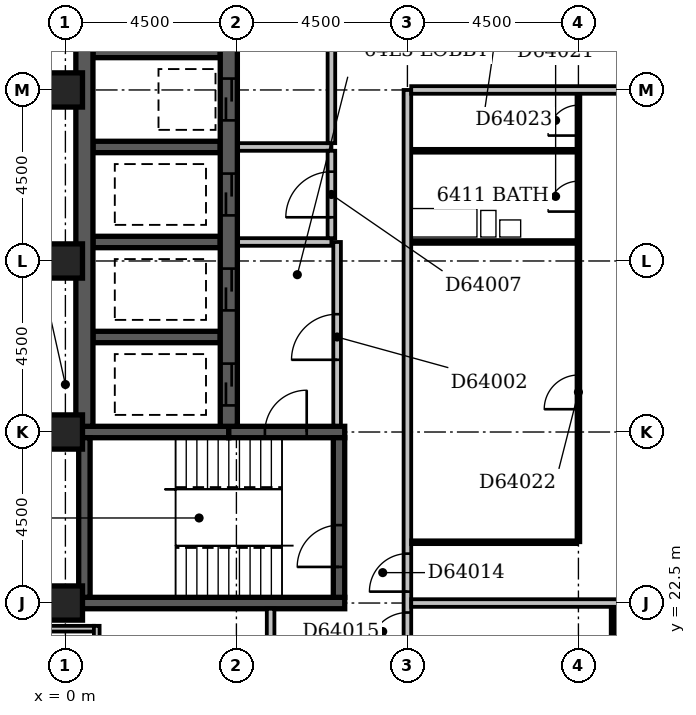
"""IFC4 building model, lengths in metres.
Left out: names, types, materials, properties, quantities, classifications, styles, units other than length and angle.
Written with IfcOpenShell. Run it as: python <this file> out.ifc"""

import sys

from ifc_helpers import new_model, si_unit, direction, frame, frame_2d, origin, origin_2d, place, context, subcontext, project, spatial, rectangle, extrude, element, fill, save


model = new_model("IFC4")
c1 = context("Model", 3, precision=1e-05, world=origin(), true_north=direction((0.0, 1.0)))
c2 = subcontext(c1, "Body", "Model", "MODEL_VIEW")
j1 = project(units=[si_unit("LENGTHUNIT", "METRE"), si_unit("PLANEANGLEUNIT", "RADIAN")], contexts=[c1])
p1 = place(None, origin())
s1 = spatial("IfcSite", under=j1, at=p1, CompositionType="ELEMENT")
p2 = place(p1, origin())
s2 = spatial("IfcBuilding", under=s1, at=p2, CompositionType="ELEMENT")
p3 = place(p2, frame((0.0, 0.0, 247.4)))
s3 = spatial("IfcBuildingStorey", under=s2, at=p3, CompositionType="ELEMENT", Elevation=247.4)
p4 = place(p3, frame((0.35, 22.5, -0.3), z_axis=(0.0, 0.0, 1.0), x_axis=(1.0, 0.0, 0.0)))
e1 = element("IfcWall", 1, at=p4, inside=s3, PredefinedType="SHEAR", context=c2, shape_type="SweptSolid", body=[
    extrude(rectangle(XDim=7.0, YDim=0.3, at=frame_2d((3.5, 0.0))), origin(), (0.0, 0.0, 1.0), 3.6),
])
p5 = place(p3, frame((0.35, 27.0, -0.3), z_axis=(0.0, 0.0, 1.0), x_axis=(1.0, 0.0, 0.0)))
e2 = element("IfcWall", 2, at=p5, inside=s3, PredefinedType="SHEAR", context=c2, shape_type="SweptSolid", body=[
    extrude(rectangle(XDim=3.95, YDim=0.3, at=frame_2d((1.975, 0.0))), origin(), (0.0, 0.0, 1.0), 3.6),
])
p6 = place(p3, frame((0.5, 22.65, -0.3), z_axis=(0.0, 0.0, 1.0), x_axis=(0.0, 1.0, 0.0)))
e3 = element("IfcWall", 3, at=p6, inside=s3, PredefinedType="SHEAR", context=c2, shape_type="SweptSolid", body=[
    extrude(rectangle(XDim=4.2, YDim=0.3, at=frame_2d((2.1, 0.0))), origin(), (0.0, 0.0, 1.0), 3.6),
])
p7 = place(p3, frame((0.5, 27.15, -0.3), z_axis=(0.0, 0.0, 1.0), x_axis=(0.0, 1.0, 0.0)))
e4 = element("IfcWall", 4, at=p7, inside=s3, PredefinedType="SHEAR", context=c2, shape_type="SweptSolid", body=[
    extrude(rectangle(XDim=22.125, YDim=0.45, at=frame_2d((11.062, 0.0))), origin(), (0.0, 0.0, 1.0), 3.6),
])
for number, where, z_axis, x_axis in (
    (5, (0.725, 29.5, -0.3), (0.0, 0.0, 1.0), (1.0, 0.0, 0.0)),
    (6, (0.725, 32.0, -0.3), (0.0, 0.0, 1.0), (1.0, 0.0, 0.0)),
    (7, (0.725, 34.5, -0.3), (0.0, 0.0, 1.0), (1.0, 0.0, 0.0)),
    (8, (0.725, 37.0, -0.3), (0.0, 0.0, 1.0), (1.0, 0.0, 0.0)),
):
    element("IfcWall", number, at=place(p3, frame(where, z_axis=z_axis, x_axis=x_axis)), inside=s3, PredefinedType="SHEAR", context=c2, shape_type="SweptSolid", body=[
        extrude(rectangle(XDim=3.35, YDim=0.3, at=frame_2d((1.675, 0.0))), origin(), (0.0, 0.0, 1.0), 3.6),
    ])
p8 = place(p3, frame((4.3, 27.0, -0.3), z_axis=(0.0, 0.0, 1.0), x_axis=(1.0, 0.0, 0.0)))
e9 = element("IfcWall", 9, at=p8, inside=s3, PredefinedType="SHEAR", context=c2, shape_type="SweptSolid", body=[
    extrude(rectangle(XDim=3.05, YDim=0.3, at=frame_2d((1.525, 0.0))), origin(), (0.0, 0.0, 1.0), 3.6),
])
p9 = place(p8, frame((0.95, 0.0, 0.3)))
e10 = element("IfcOpeningElement", 10, at=p9, cuts=e9, PredefinedType="OPENING", context=c2, shape_type="SweptSolid", body=[
    extrude(rectangle(XDim=1.1, YDim=2.1, at=frame_2d((0.55, 1.05))), frame((0.0, 0.162, 0.0), z_axis=(0.0, -1.0, 0.0), x_axis=(1.0, 0.0, 0.0)), (0.0, 0.0, 1.0), 0.324),
])
p10 = place(p3, frame((4.3, 27.15, -0.3), z_axis=(0.0, 0.0, 1.0), x_axis=(0.0, 1.0, 0.0)))
e11 = element("IfcWall", 11, at=p10, inside=s3, PredefinedType="SHEAR", context=c2, shape_type="SweptSolid", body=[
    extrude(rectangle(XDim=22.125, YDim=0.45, at=frame_2d((11.062, 0.0))), origin(), (0.0, 0.0, 1.0), 3.6),
])
p11 = place(p10, frame((3.05, 0.0, 0.3)))
e12 = element("IfcOpeningElement", 12, at=p11, cuts=e11, PredefinedType="OPENING", context=c2, shape_type="SweptSolid", body=[
    extrude(rectangle(XDim=1.1, YDim=2.1, at=frame_2d((0.55, 1.05))), frame((0.0, 0.237, 0.0), z_axis=(0.0, -1.0, 0.0), x_axis=(1.0, 0.0, 0.0)), (0.0, 0.0, 1.0), 0.474),
])
p12 = place(p10, frame((0.55, 0.0, 0.3)))
e13 = element("IfcOpeningElement", 13, at=p12, cuts=e11, PredefinedType="OPENING", context=c2, shape_type="SweptSolid", body=[
    extrude(rectangle(XDim=1.1, YDim=2.1, at=frame_2d((0.55, 1.05))), frame((0.0, 0.237, 0.0), z_axis=(0.0, -1.0, 0.0), x_axis=(1.0, 0.0, 0.0)), (0.0, 0.0, 1.0), 0.474),
])
p13 = place(p10, frame((20.55, 0.0, 0.3)))
e14 = element("IfcOpeningElement", 14, at=p13, cuts=e11, PredefinedType="OPENING", context=c2, shape_type="SweptSolid", body=[
    extrude(rectangle(XDim=1.1, YDim=2.1, at=frame_2d((0.55, 1.05))), frame((0.0, 0.237, 0.0), z_axis=(0.0, -1.0, 0.0), x_axis=(1.0, 0.0, 0.0)), (0.0, 0.0, 1.0), 0.474),
])
p14 = place(p10, frame((18.05, 0.0, 0.3)))
e15 = element("IfcOpeningElement", 15, at=p14, cuts=e11, PredefinedType="OPENING", context=c2, shape_type="SweptSolid", body=[
    extrude(rectangle(XDim=1.1, YDim=2.1, at=frame_2d((0.55, 1.05))), frame((0.0, 0.237, 0.0), z_axis=(0.0, -1.0, 0.0), x_axis=(1.0, 0.0, 0.0)), (0.0, 0.0, 1.0), 0.474),
])
p15 = place(p10, frame((15.55, 0.0, 0.3)))
e16 = element("IfcOpeningElement", 16, at=p15, cuts=e11, PredefinedType="OPENING", context=c2, shape_type="SweptSolid", body=[
    extrude(rectangle(XDim=1.1, YDim=2.1, at=frame_2d((0.55, 1.05))), frame((0.0, 0.237, 0.0), z_axis=(0.0, -1.0, 0.0), x_axis=(1.0, 0.0, 0.0)), (0.0, 0.0, 1.0), 0.474),
])
p16 = place(p10, frame((13.05, 0.0, 0.3)))
e17 = element("IfcOpeningElement", 17, at=p16, cuts=e11, PredefinedType="OPENING", context=c2, shape_type="SweptSolid", body=[
    extrude(rectangle(XDim=1.1, YDim=2.1, at=frame_2d((0.55, 1.05))), frame((0.0, 0.237, 0.0), z_axis=(0.0, -1.0, 0.0), x_axis=(1.0, 0.0, 0.0)), (0.0, 0.0, 1.0), 0.474),
])
p17 = place(p10, frame((10.55, 0.0, 0.3)))
e18 = element("IfcOpeningElement", 18, at=p17, cuts=e11, PredefinedType="OPENING", context=c2, shape_type="SweptSolid", body=[
    extrude(rectangle(XDim=1.1, YDim=2.1, at=frame_2d((0.55, 1.05))), frame((0.0, 0.237, 0.0), z_axis=(0.0, -1.0, 0.0), x_axis=(1.0, 0.0, 0.0)), (0.0, 0.0, 1.0), 0.474),
])
p18 = place(p10, frame((8.05, 0.0, 0.3)))
e19 = element("IfcOpeningElement", 19, at=p18, cuts=e11, PredefinedType="OPENING", context=c2, shape_type="SweptSolid", body=[
    extrude(rectangle(XDim=1.1, YDim=2.1, at=frame_2d((0.55, 1.05))), frame((0.0, 0.237, 0.0), z_axis=(0.0, -1.0, 0.0), x_axis=(1.0, 0.0, 0.0)), (0.0, 0.0, 1.0), 0.474),
])
p19 = place(p10, frame((5.55, 0.0, 0.3)))
e20 = element("IfcOpeningElement", 20, at=p19, cuts=e11, PredefinedType="OPENING", context=c2, shape_type="SweptSolid", body=[
    extrude(rectangle(XDim=1.1, YDim=2.1, at=frame_2d((0.55, 1.05))), frame((0.0, 0.237, 0.0), z_axis=(0.0, -1.0, 0.0), x_axis=(1.0, 0.0, 0.0)), (0.0, 0.0, 1.0), 0.474),
])
p20 = place(p3, frame((7.2, 22.65, -0.3), z_axis=(0.0, 0.0, 1.0), x_axis=(0.0, 1.0, 0.0)))
e21 = element("IfcWall", 21, at=p20, inside=s3, PredefinedType="SHEAR", context=c2, shape_type="SweptSolid", body=[
    extrude(rectangle(XDim=4.2, YDim=0.3, at=frame_2d((2.1, 0.0))), origin(), (0.0, 0.0, 1.0), 3.6),
])
p21 = place(p20, frame((0.8, 0.0, 0.3)))
e22 = element("IfcOpeningElement", 22, at=p21, cuts=e21, PredefinedType="OPENING", context=c2, shape_type="SweptSolid", body=[
    extrude(rectangle(XDim=1.1, YDim=2.1, at=frame_2d((0.55, 1.05))), frame((0.0, 0.162, 0.0), z_axis=(0.0, -1.0, 0.0), x_axis=(1.0, 0.0, 0.0)), (0.0, 0.0, 1.0), 0.324),
])
for number, where, z_axis, x_axis in (
    (23, (0.0, 22.5, -0.3), (0.0, 0.0, 1.0), (1.0, 0.0, 0.0)),
    (24, (0.0, 27.0, -0.3), (0.0, 0.0, 1.0), (1.0, 0.0, 0.0)),
    (25, (0.0, 31.5, -0.3), (0.0, 0.0, 1.0), (1.0, 0.0, 0.0)),
    (26, (0.0, 36.0, -0.3), (0.0, 0.0, 1.0), (1.0, 0.0, 0.0)),
):
    element("IfcColumn", number, at=place(p3, frame(where, z_axis=z_axis, x_axis=x_axis)), inside=s3, PredefinedType="COLUMN", context=c2, shape_type="SweptSolid", body=[
        extrude(rectangle(XDim=0.9, YDim=0.9, at=origin_2d()), origin(), (0.0, 0.0, 1.0), 3.6),
    ])
p22 = place(p3, frame((-0.6, 21.825, 0.0), z_axis=(0.0, 0.0, 1.0), x_axis=(1.0, 0.0, 0.0)))
e27 = element("IfcWall", 27, at=p22, inside=s3, PredefinedType="STANDARD", context=c2, shape_type="SweptSolid", body=[
    extrude(rectangle(XDim=1.35, YDim=0.15, at=frame_2d((0.675, 0.0))), origin(), (0.0, 0.0, 1.0), 2.7),
])
p23 = place(p3, frame((0.825, 21.9, 0.0), z_axis=(0.0, 0.0, 1.0), x_axis=(0.0, -1.0, 0.0)))
e28 = element("IfcWall", 28, at=p23, inside=s3, PredefinedType="STANDARD", context=c2, shape_type="SweptSolid", body=[
    extrude(rectangle(XDim=1.65, YDim=0.15, at=frame_2d((0.825, 0.0))), origin(), (0.0, 0.0, 1.0), 2.7),
])
p24 = place(p3, frame((4.545, 34.5, 0.0), z_axis=(0.0, 0.0, 1.0), x_axis=(1.0, 0.0, 0.0)))
e29 = element("IfcWall", 29, at=p24, inside=s3, PredefinedType="PARTITIONING", context=c2, shape_type="SweptSolid", body=[
    extrude(rectangle(XDim=2.455, YDim=0.2, at=frame_2d((1.228, 0.0))), origin(), (0.0, 0.0, 1.0), 3.3),
])
p25 = place(p3, frame((7.0, 34.6, 0.0), z_axis=(0.0, 0.0, 1.0), x_axis=(0.0, 1.0, 0.0)))
e30 = element("IfcWall", 30, at=p25, inside=s3, PredefinedType="PARTITIONING", context=c2, shape_type="SweptSolid", body=[
    extrude(rectangle(XDim=14.9, YDim=0.2, at=frame_2d((7.45, 0.0))), origin(), (0.0, 0.0, 1.0), 3.3),
])
p26 = place(p25, frame((2.8, 0.0, 0.0)))
e31 = element("IfcOpeningElement", 31, at=p26, cuts=e30, PredefinedType="OPENING", context=c2, shape_type="SweptSolid", body=[
    extrude(rectangle(XDim=1.2, YDim=2.1, at=frame_2d((0.6, 1.05))), frame((0.0, 0.112, 0.0), z_axis=(0.0, -1.0, 0.0), x_axis=(1.0, 0.0, 0.0)), (0.0, 0.0, 1.0), 0.224),
])
p27 = place(p25, frame((9.8, 0.0, 0.0)))
e32 = element("IfcOpeningElement", 32, at=p27, cuts=e30, PredefinedType="OPENING", context=c2, shape_type="SweptSolid", body=[
    extrude(rectangle(XDim=1.2, YDim=2.1, at=frame_2d((0.6, 1.05))), frame((0.0, 0.112, 0.0), z_axis=(0.0, -1.0, 0.0), x_axis=(1.0, 0.0, 0.0)), (0.0, 0.0, 1.0), 0.224),
])
p28 = place(p3, frame((4.545, 32.0, 0.0), z_axis=(0.0, 0.0, 1.0), x_axis=(1.0, 0.0, 0.0)))
e33 = element("IfcWall", 33, at=p28, inside=s3, PredefinedType="PARTITIONING", context=c2, shape_type="SweptSolid", body=[
    extrude(rectangle(XDim=2.455, YDim=0.2, at=frame_2d((1.228, 0.0))), origin(), (0.0, 0.0, 1.0), 3.3),
])
p29 = place(p3, frame((7.0, 32.1, 0.0), z_axis=(0.0, 0.0, 1.0), x_axis=(0.0, 1.0, 0.0)))
e34 = element("IfcWall", 34, at=p29, inside=s3, PredefinedType="PARTITIONING", context=c2, shape_type="SweptSolid", body=[
    extrude(rectangle(XDim=2.3, YDim=0.2, at=frame_2d((1.15, 0.0))), origin(), (0.0, 0.0, 1.0), 3.3),
])
p30 = place(p29, frame((0.55, 0.0, 0.0)))
e35 = element("IfcOpeningElement", 35, at=p30, cuts=e34, PredefinedType="OPENING", context=c2, shape_type="SweptSolid", body=[
    extrude(rectangle(XDim=1.2, YDim=2.1, at=frame_2d((0.6, 1.05))), frame((0.0, 0.112, 0.0), z_axis=(0.0, -1.0, 0.0), x_axis=(1.0, 0.0, 0.0)), (0.0, 0.0, 1.0), 0.224),
])
p31 = place(p3, frame((7.15, 27.17, 0.0), z_axis=(0.0, 0.0, 1.0), x_axis=(0.0, 1.0, 0.0)))
e36 = element("IfcWall", 36, at=p31, inside=s3, PredefinedType="PARTITIONING", context=c2, shape_type="SweptSolid", body=[
    extrude(rectangle(XDim=4.83, YDim=0.2, at=frame_2d((2.415, 0.0))), origin(), (0.0, 0.0, 1.0), 3.3),
])
p32 = place(p31, frame((1.73, 0.0, 0.0)))
e37 = element("IfcOpeningElement", 37, at=p32, cuts=e36, PredefinedType="OPENING", context=c2, shape_type="SweptSolid", body=[
    extrude(rectangle(XDim=1.2, YDim=2.1, at=frame_2d((0.6, 1.05))), frame((0.0, 0.112, 0.0), z_axis=(0.0, -1.0, 0.0), x_axis=(1.0, 0.0, 0.0)), (0.0, 0.0, 1.0), 0.224),
])
p33 = place(p3, frame((5.4, 17.4, 0.0), z_axis=(0.0, 0.0, 1.0), x_axis=(0.0, 1.0, 0.0)))
e38 = element("IfcWall", 38, at=p33, inside=s3, PredefinedType="PARTITIONING", context=c2, shape_type="SweptSolid", body=[
    extrude(rectangle(XDim=4.95, YDim=0.2, at=frame_2d((2.475, 0.0))), origin(), (0.0, 0.0, 1.0), 3.3),
])
p34 = place(p33, frame((2.55, 0.0, 0.0)))
e39 = element("IfcOpeningElement", 39, at=p34, cuts=e38, PredefinedType="OPENING", context=c2, shape_type="SweptSolid", body=[
    extrude(rectangle(XDim=1.0, YDim=2.1, at=frame_2d((0.5, 1.05))), frame((0.0, 0.112, 0.0), z_axis=(0.0, -1.0, 0.0), x_axis=(1.0, 0.0, 0.0)), (0.0, 0.0, 1.0), 0.224),
])
p35 = place(p3, frame((14.4, 17.4, 0.0), z_axis=(0.0, 0.0, 1.0), x_axis=(0.0, 1.0, 0.0)))
e40 = element("IfcWall", 40, at=p35, inside=s3, PredefinedType="PARTITIONING", context=c2, shape_type="SweptSolid", body=[
    extrude(rectangle(XDim=5.0, YDim=0.1, at=frame_2d((2.5, 0.0))), origin(), (0.0, 0.0, 1.0), 3.3),
])
p36 = place(p35, frame((2.4, 0.0, 0.0)))
e41 = element("IfcOpeningElement", 41, at=p36, cuts=e40, PredefinedType="OPENING", context=c2, shape_type="SweptSolid", body=[
    extrude(rectangle(XDim=0.9, YDim=2.1, at=frame_2d((0.45, 1.05))), frame((0.0, 0.062, 0.0), z_axis=(0.0, -1.0, 0.0), x_axis=(1.0, 0.0, 0.0)), (0.0, 0.0, 1.0), 0.124),
])
p37 = place(p3, frame((9.0, 18.45, 0.0), z_axis=(0.0, 0.0, 1.0), x_axis=(0.0, 1.0, 0.0)))
e42 = element("IfcWall", 42, at=p37, inside=s3, PredefinedType="PARTITIONING", context=c2, shape_type="SweptSolid", body=[
    extrude(rectangle(XDim=17.55, YDim=0.2, at=frame_2d((8.775, 0.0))), origin(), (0.0, 0.0, 1.0), 3.3),
])
p38 = place(p37, frame((4.35, 0.0, 0.0)))
e43 = element("IfcOpeningElement", 43, at=p38, cuts=e42, PredefinedType="OPENING", context=c2, shape_type="SweptSolid", body=[
    extrude(rectangle(XDim=1.0, YDim=2.1, at=frame_2d((0.5, 1.05))), frame((0.0, 0.112, 0.0), z_axis=(0.0, -1.0, 0.0), x_axis=(1.0, 0.0, 0.0)), (0.0, 0.0, 1.0), 0.224),
])
p39 = place(p37, frame((2.8, 0.0, 0.0)))
e44 = element("IfcOpeningElement", 44, at=p39, cuts=e42, PredefinedType="OPENING", context=c2, shape_type="SweptSolid", body=[
    extrude(rectangle(XDim=1.0, YDim=2.1, at=frame_2d((0.5, 1.05))), frame((0.0, 0.112, 0.0), z_axis=(0.0, -1.0, 0.0), x_axis=(1.0, 0.0, 0.0)), (0.0, 0.0, 1.0), 0.224),
])
p40 = place(p3, frame((9.1, 22.5, 0.0), z_axis=(0.0, 0.0, 1.0), x_axis=(1.0, 0.0, 0.0)))
e45 = element("IfcWall", 45, at=p40, inside=s3, PredefinedType="PARTITIONING", context=c2, shape_type="SweptSolid", body=[
    extrude(rectangle(XDim=12.95, YDim=0.2, at=frame_2d((6.475, 0.0))), origin(), (0.0, 0.0, 1.0), 3.3),
])
p41 = place(p3, frame((9.1, 24.1, 0.0), z_axis=(0.0, 0.0, 1.0), x_axis=(1.0, 0.0, 0.0)))
e46 = element("IfcWall", 46, at=p41, inside=s3, PredefinedType="PARTITIONING", context=c2, shape_type="SweptSolid", body=[
    extrude(rectangle(XDim=4.35, YDim=0.1, at=frame_2d((2.175, 0.0))), origin(), (0.0, 0.0, 1.0), 3.3),
])
p42 = place(p3, frame((13.5, 24.1, 0.0), z_axis=(0.0, 0.0, 1.0), x_axis=(0.0, 1.0, 0.0)))
e47 = element("IfcWall", 47, at=p42, inside=s3, PredefinedType="PARTITIONING", context=c2, shape_type="SweptSolid", body=[
    extrude(rectangle(XDim=11.8, YDim=0.1, at=frame_2d((5.9, 0.0))), origin(), (0.0, 0.0, 1.0), 3.3),
])
p43 = place(p42, frame((8.7, 0.0, 0.0)))
e48 = element("IfcOpeningElement", 48, at=p43, cuts=e47, PredefinedType="OPENING", context=c2, shape_type="SweptSolid", body=[
    extrude(rectangle(XDim=0.8, YDim=2.1, at=frame_2d((0.4, 1.05))), frame((0.0, 0.062, 0.0), z_axis=(0.0, -1.0, 0.0), x_axis=(1.0, 0.0, 0.0)), (0.0, 0.0, 1.0), 0.124),
])
p44 = place(p42, frame((3.5, 0.0, 0.0)))
e49 = element("IfcOpeningElement", 49, at=p44, cuts=e47, PredefinedType="OPENING", context=c2, shape_type="SweptSolid", body=[
    extrude(rectangle(XDim=0.9, YDim=2.1, at=frame_2d((0.45, 1.05))), frame((0.0, 0.062, 0.0), z_axis=(0.0, -1.0, 0.0), x_axis=(1.0, 0.0, 0.0)), (0.0, 0.0, 1.0), 0.124),
])
p45 = place(p42, frame((10.7, 0.0, 0.0)))
e50 = element("IfcOpeningElement", 50, at=p45, cuts=e47, PredefinedType="OPENING", context=c2, shape_type="SweptSolid", body=[
    extrude(rectangle(XDim=0.8, YDim=2.1, at=frame_2d((0.4, 1.05))), frame((0.0, 0.062, 0.0), z_axis=(0.0, -1.0, 0.0), x_axis=(1.0, 0.0, 0.0)), (0.0, 0.0, 1.0), 0.124),
])
for number, where, z_axis, x_axis in (
    (51, (9.1, 32.0, 0.0), (0.0, 0.0, 1.0), (1.0, 0.0, 0.0)),
    (52, (9.1, 34.4, 0.0), (0.0, 0.0, 1.0), (1.0, 0.0, 0.0)),
):
    element("IfcWall", number, at=place(p3, frame(where, z_axis=z_axis, x_axis=x_axis)), inside=s3, PredefinedType="PLUMBINGWALL", context=c2, shape_type="SweptSolid", body=[
        extrude(rectangle(XDim=4.35, YDim=0.1, at=frame_2d((2.175, 0.0))), origin(), (0.0, 0.0, 1.0), 3.3),
    ])
p46 = place(p3, frame((9.1, 36.0, 0.0), z_axis=(0.0, 0.0, 1.0), x_axis=(1.0, 0.0, 0.0)))
e53 = element("IfcWall", 53, at=p46, inside=s3, PredefinedType="PARTITIONING", context=c2, shape_type="SweptSolid", body=[
    extrude(rectangle(XDim=12.95, YDim=0.2, at=frame_2d((6.475, 0.0))), origin(), (0.0, 0.0, 1.0), 3.3),
])
p47 = place(p32, origin())
e54 = element("IfcDoor", 54, at=p47, inside=s3, OperationType="SINGLE_SWING_LEFT", PredefinedType="DOOR", context=c2, shape_type="SweptSolid", body=[
    extrude(rectangle(XDim=1.2, YDim=2.1, at=frame_2d((0.6, 1.05))), frame((0.0, 0.025, 0.0), z_axis=(0.0, -1.0, 0.0), x_axis=(1.0, 0.0, 0.0)), (0.0, 0.0, 1.0), 0.05),
])
fill(e37, e54)
p48 = place(p11, origin())
e55 = element("IfcDoor", 55, at=p48, inside=s3, OperationType="SLIDING_TO_LEFT", PredefinedType="DOOR", context=c2, shape_type="SweptSolid", body=[
    extrude(rectangle(XDim=1.1, YDim=2.1, at=frame_2d((0.55, 1.05))), frame((0.0, 0.025, 0.0), z_axis=(0.0, -1.0, 0.0), x_axis=(1.0, 0.0, 0.0)), (0.0, 0.0, 1.0), 0.05),
])
fill(e12, e55)
p49 = place(p12, origin())
e56 = element("IfcDoor", 56, at=p49, inside=s3, OperationType="SLIDING_TO_LEFT", PredefinedType="DOOR", context=c2, shape_type="SweptSolid", body=[
    extrude(rectangle(XDim=1.1, YDim=2.1, at=frame_2d((0.55, 1.05))), frame((0.0, 0.025, 0.0), z_axis=(0.0, -1.0, 0.0), x_axis=(1.0, 0.0, 0.0)), (0.0, 0.0, 1.0), 0.05),
])
fill(e13, e56)
p50 = place(p18, origin())
e57 = element("IfcDoor", 57, at=p50, inside=s3, OperationType="SLIDING_TO_LEFT", PredefinedType="DOOR", context=c2, shape_type="SweptSolid", body=[
    extrude(rectangle(XDim=1.1, YDim=2.1, at=frame_2d((0.55, 1.05))), frame((0.0, 0.025, 0.0), z_axis=(0.0, -1.0, 0.0), x_axis=(1.0, 0.0, 0.0)), (0.0, 0.0, 1.0), 0.05),
])
fill(e19, e57)
p51 = place(p30, origin())
e58 = element("IfcDoor", 58, at=p51, inside=s3, OperationType="SINGLE_SWING_LEFT", PredefinedType="DOOR", context=c2, shape_type="SweptSolid", body=[
    extrude(rectangle(XDim=1.2, YDim=2.1, at=frame_2d((0.6, 1.05))), frame((0.0, 0.025, 0.0), z_axis=(0.0, -1.0, 0.0), x_axis=(1.0, 0.0, 0.0)), (0.0, 0.0, 1.0), 0.05),
])
fill(e35, e58)
p52 = place(p19, origin())
e59 = element("IfcDoor", 59, at=p52, inside=s3, OperationType="SLIDING_TO_LEFT", PredefinedType="DOOR", context=c2, shape_type="SweptSolid", body=[
    extrude(rectangle(XDim=1.1, YDim=2.1, at=frame_2d((0.55, 1.05))), frame((0.0, 0.025, 0.0), z_axis=(0.0, -1.0, 0.0), x_axis=(1.0, 0.0, 0.0)), (0.0, 0.0, 1.0), 0.05),
])
fill(e20, e59)
p53 = place(p9, frame((1.1, 0.0, 0.0), z_axis=(0.0, 0.0, 1.0), x_axis=(-1.0, 0.0, 0.0)))
e60 = element("IfcDoor", 60, at=p53, inside=s3, OperationType="SINGLE_SWING_LEFT", PredefinedType="DOOR", context=c2, shape_type="SweptSolid", body=[
    extrude(rectangle(XDim=1.1, YDim=2.1, at=frame_2d((0.55, 1.05))), frame((0.0, 0.025, 0.0), z_axis=(0.0, -1.0, 0.0), x_axis=(1.0, 0.0, 0.0)), (0.0, 0.0, 1.0), 0.05),
])
fill(e10, e60)
p54 = place(p21, origin())
e61 = element("IfcDoor", 61, at=p54, inside=s3, OperationType="SINGLE_SWING_LEFT", PredefinedType="DOOR", context=c2, shape_type="SweptSolid", body=[
    extrude(rectangle(XDim=1.1, YDim=2.1, at=frame_2d((0.55, 1.05))), frame((0.0, 0.025, 0.0), z_axis=(0.0, -1.0, 0.0), x_axis=(1.0, 0.0, 0.0)), (0.0, 0.0, 1.0), 0.05),
])
fill(e22, e61)
p55 = place(p38, origin())
e62 = element("IfcDoor", 62, at=p55, inside=s3, OperationType="SINGLE_SWING_LEFT", PredefinedType="DOOR", context=c2, shape_type="SweptSolid", body=[
    extrude(rectangle(XDim=1.0, YDim=2.1, at=frame_2d((0.5, 1.05))), frame((0.0, 0.025, 0.0), z_axis=(0.0, -1.0, 0.0), x_axis=(1.0, 0.0, 0.0)), (0.0, 0.0, 1.0), 0.05),
])
fill(e43, e62)
p56 = place(p39, origin())
e63 = element("IfcDoor", 63, at=p56, inside=s3, OperationType="SINGLE_SWING_LEFT", PredefinedType="DOOR", context=c2, shape_type="SweptSolid", body=[
    extrude(rectangle(XDim=1.0, YDim=2.1, at=frame_2d((0.5, 1.05))), frame((0.0, 0.025, 0.0), z_axis=(0.0, -1.0, 0.0), x_axis=(1.0, 0.0, 0.0)), (0.0, 0.0, 1.0), 0.05),
])
fill(e44, e63)
p57 = place(p43, origin())
e64 = element("IfcDoor", 64, at=p57, inside=s3, OperationType="SINGLE_SWING_LEFT", PredefinedType="DOOR", context=c2, shape_type="SweptSolid", body=[
    extrude(rectangle(XDim=0.8, YDim=2.1, at=frame_2d((0.4, 1.05))), frame((0.0, 0.025, 0.0), z_axis=(0.0, -1.0, 0.0), x_axis=(1.0, 0.0, 0.0)), (0.0, 0.0, 1.0), 0.05),
])
fill(e48, e64)
p58 = place(p44, origin())
e65 = element("IfcDoor", 65, at=p58, inside=s3, OperationType="SINGLE_SWING_LEFT", PredefinedType="DOOR", context=c2, shape_type="SweptSolid", body=[
    extrude(rectangle(XDim=0.9, YDim=2.1, at=frame_2d((0.45, 1.05))), frame((0.0, 0.025, 0.0), z_axis=(0.0, -1.0, 0.0), x_axis=(1.0, 0.0, 0.0)), (0.0, 0.0, 1.0), 0.05),
])
fill(e49, e65)
p59 = place(p45, origin())
e66 = element("IfcDoor", 66, at=p59, inside=s3, OperationType="SINGLE_SWING_LEFT", PredefinedType="DOOR", context=c2, shape_type="SweptSolid", body=[
    extrude(rectangle(XDim=0.8, YDim=2.1, at=frame_2d((0.4, 1.05))), frame((0.0, 0.025, 0.0), z_axis=(0.0, -1.0, 0.0), x_axis=(1.0, 0.0, 0.0)), (0.0, 0.0, 1.0), 0.05),
])
fill(e50, e66)
save(model, sys.argv[1])
